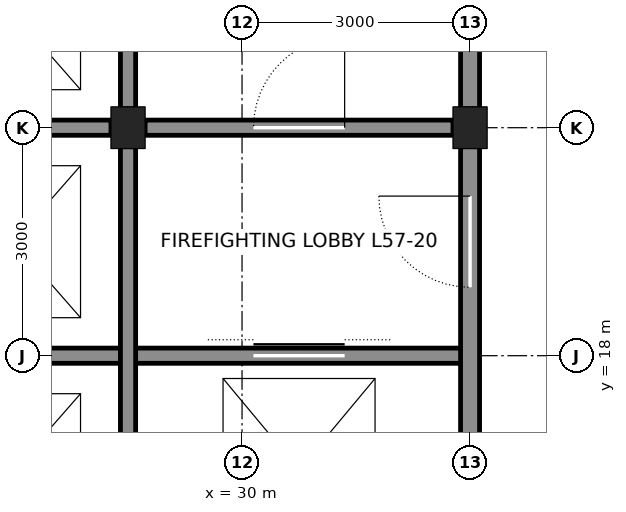
"""IFC4 building model, lengths in metres.
Left out: names, types, materials, properties, quantities, classifications, styles, units other than length and angle.
Written with IfcOpenShell. Run it as: python <this file> out.ifc"""

import sys

from ifc_helpers import new_model, si_unit, direction, frame, frame_2d, origin, origin_2d, place, context, subcontext, project, spatial, rectangle, i_section, extrude, element, fill, save


model = new_model("IFC4")
c1 = context("Model", 3, precision=1e-05, world=origin(), true_north=direction((0.0, 1.0)))
c2 = subcontext(c1, "Body", "Model", "MODEL_VIEW")
j1 = project(units=[si_unit("LENGTHUNIT", "METRE"), si_unit("PLANEANGLEUNIT", "RADIAN")], contexts=[c1])
p1 = place(None, origin())
s1 = spatial("IfcSite", under=j1, at=p1, CompositionType="ELEMENT")
p2 = place(p1, origin())
s2 = spatial("IfcBuilding", under=s1, at=p2, CompositionType="ELEMENT")
p3 = place(p2, frame((0.0, 0.0, 257.7)))
s3 = spatial("IfcBuildingStorey", under=s2, at=p3, CompositionType="ELEMENT", Elevation=257.7)
for number, where, z_axis, x_axis in (
    (1, (33.0, 21.0, 0.0), (0.0, 0.0, 1.0), (1.0, 0.0, 0.0)),
    (2, (28.5, 21.0, 0.0), (0.0, 0.0, 1.0), (1.0, 0.0, 0.0)),
):
    element("IfcColumn", number, at=place(p3, frame(where, z_axis=z_axis, x_axis=x_axis)), inside=s3, PredefinedType="COLUMN", context=c2, shape_type="SweptSolid", body=[
        extrude(i_section(OverallWidth=0.449, OverallDepth=0.549, WebThickness=0.072, FlangeThickness=0.115, at=origin_2d()), origin(), (0.0, 0.0, 1.0), 4.5),
    ])
p4 = place(p3, frame((25.5, 18.0, 0.0), z_axis=(0.0, 0.0, 1.0), x_axis=(1.0, 0.0, 0.0)))
e3 = element("IfcWall", 3, at=p4, inside=s3, PredefinedType="SOLIDWALL", context=c2, shape_type="SweptSolid", body=[
    extrude(rectangle(XDim=7.5, YDim=0.2, at=frame_2d((3.75, 0.0))), origin(), (0.0, 0.0, 1.0), 4.34),
])
p5 = place(p4, frame((4.65, 0.0, 0.0)))
e4 = element("IfcOpeningElement", 4, at=p5, cuts=e3, PredefinedType="OPENING", context=c2, shape_type="SweptSolid", body=[
    extrude(rectangle(XDim=1.2, YDim=2.1, at=frame_2d((0.6, 1.05))), frame((0.0, 0.11, 0.0), z_axis=(0.0, -1.0, 0.0), x_axis=(1.0, 0.0, 0.0)), (0.0, 0.0, 1.0), 0.22),
])
p6 = place(p3, frame((25.5, 21.0, 0.0), z_axis=(0.0, 0.0, 1.0), x_axis=(1.0, 0.0, 0.0)))
e5 = element("IfcWall", 5, at=p6, inside=s3, PredefinedType="SOLIDWALL", context=c2, shape_type="SweptSolid", body=[
    extrude(rectangle(XDim=2.775, YDim=0.2, at=frame_2d((1.388, 0.0))), origin(), (0.0, 0.0, 1.0), 3.39),
])
p7 = place(p3, frame((28.725, 21.0, 0.0), z_axis=(0.0, 0.0, 1.0), x_axis=(1.0, 0.0, 0.0)))
e6 = element("IfcWall", 6, at=p7, inside=s3, PredefinedType="SOLIDWALL", context=c2, shape_type="SweptSolid", body=[
    extrude(rectangle(XDim=4.05, YDim=0.2, at=frame_2d((2.025, 0.0))), origin(), (0.0, 0.0, 1.0), 3.39),
])
p8 = place(p7, frame((1.425, 0.0, 0.0)))
e7 = element("IfcOpeningElement", 7, at=p8, cuts=e6, PredefinedType="OPENING", context=c2, shape_type="SweptSolid", body=[
    extrude(rectangle(XDim=1.2, YDim=2.1, at=frame_2d((0.6, 1.05))), frame((0.0, 0.11, 0.0), z_axis=(0.0, -1.0, 0.0), x_axis=(1.0, 0.0, 0.0)), (0.0, 0.0, 1.0), 0.22),
])
p9 = place(p3, frame((28.5, 12.25, 0.0), z_axis=(0.0, 0.0, 1.0), x_axis=(0.0, 1.0, 0.0)))
e8 = element("IfcWall", 8, at=p9, inside=s3, PredefinedType="SOLIDWALL", context=c2, shape_type="SweptSolid", body=[
    extrude(rectangle(XDim=8.5, YDim=0.2, at=frame_2d((4.25, 0.0))), origin(), (0.0, 0.0, 1.0), 3.413),
])
p10 = place(p3, frame((28.5, 21.25, 0.0), z_axis=(0.0, 0.0, 1.0), x_axis=(0.0, 1.0, 0.0)))
e9 = element("IfcWall", 9, at=p10, inside=s3, PredefinedType="SOLIDWALL", context=c2, shape_type="SweptSolid", body=[
    extrude(rectangle(XDim=2.5, YDim=0.2, at=frame_2d((1.25, 0.0))), origin(), (0.0, 0.0, 1.0), 3.413),
])
p11 = place(p3, frame((33.0, 12.25, 0.0), z_axis=(0.0, 0.0, 1.0), x_axis=(0.0, 1.0, 0.0)))
e10 = element("IfcWall", 10, at=p11, inside=s3, PredefinedType="SOLIDWALL", context=c2, shape_type="SweptSolid", body=[
    extrude(rectangle(XDim=8.5, YDim=0.25, at=frame_2d((4.25, 0.0))), origin(), (0.0, 0.0, 1.0), 3.413),
])
p12 = place(p11, frame((6.65, 0.0, 0.0)))
e11 = element("IfcOpeningElement", 11, at=p12, cuts=e10, PredefinedType="OPENING", context=c2, shape_type="SweptSolid", body=[
    extrude(rectangle(XDim=1.2, YDim=2.1, at=frame_2d((0.6, 1.05))), frame((0.0, 0.135, 0.0), z_axis=(0.0, -1.0, 0.0), x_axis=(1.0, 0.0, 0.0)), (0.0, 0.0, 1.0), 0.27),
])
p13 = place(p11, frame((0.875, 0.0, 0.0)))
e12 = element("IfcOpeningElement", 12, at=p13, cuts=e10, PredefinedType="OPENING", context=c2, shape_type="SweptSolid", body=[
    extrude(rectangle(XDim=0.75, YDim=2.1, at=frame_2d((0.375, 1.05))), frame((0.0, 0.135, 0.0), z_axis=(0.0, -1.0, 0.0), x_axis=(1.0, 0.0, 0.0)), (0.0, 0.0, 1.0), 0.27),
])
p14 = place(p3, frame((33.0, 21.25, 0.0), z_axis=(0.0, 0.0, 1.0), x_axis=(0.0, 1.0, 0.0)))
e13 = element("IfcWall", 13, at=p14, inside=s3, PredefinedType="SOLIDWALL", context=c2, shape_type="SweptSolid", body=[
    extrude(rectangle(XDim=2.5, YDim=0.25, at=frame_2d((1.25, 0.0))), origin(), (0.0, 0.0, 1.0), 3.413),
])
p15 = place(p8, origin())
e14 = element("IfcDoor", 14, at=p15, inside=s3, OperationType="SINGLE_SWING_RIGHT", PredefinedType="DOOR", context=c2, shape_type="SweptSolid", body=[
    extrude(rectangle(XDim=1.2, YDim=2.1, at=frame_2d((0.6, 1.05))), frame((0.0, 0.025, 0.0), z_axis=(0.0, -1.0, 0.0), x_axis=(1.0, 0.0, 0.0)), (0.0, 0.0, 1.0), 0.05),
])
fill(e7, e14)
p16 = place(p12, origin())
e15 = element("IfcDoor", 15, at=p16, inside=s3, OperationType="SINGLE_SWING_RIGHT", PredefinedType="DOOR", context=c2, shape_type="SweptSolid", body=[
    extrude(rectangle(XDim=1.2, YDim=2.1, at=frame_2d((0.6, 1.05))), frame((0.0, 0.025, 0.0), z_axis=(0.0, -1.0, 0.0), x_axis=(1.0, 0.0, 0.0)), (0.0, 0.0, 1.0), 0.05),
])
fill(e11, e15)
p17 = place(p5, origin())
e16 = element("IfcDoor", 16, at=p17, inside=s3, OperationType="DOUBLE_DOOR_SLIDING", PredefinedType="DOOR", context=c2, shape_type="SweptSolid", body=[
    extrude(rectangle(XDim=1.2, YDim=2.1, at=frame_2d((0.6, 1.05))), frame((0.0, 0.025, 0.0), z_axis=(0.0, -1.0, 0.0), x_axis=(1.0, 0.0, 0.0)), (0.0, 0.0, 1.0), 0.05),
])
fill(e4, e16)
save(model, sys.argv[1])
